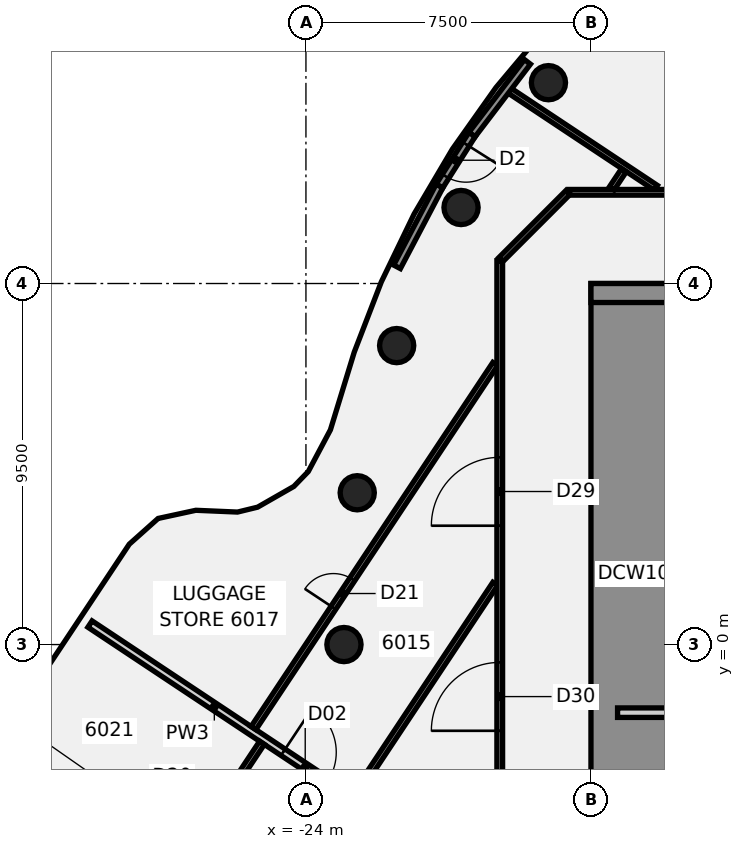
"""IFC4 building model, lengths in metres.
Left out: names, types, materials, properties, quantities, classifications, styles, units other than length and angle.
Written with IfcOpenShell. Run it as: python <this file> out.ifc"""

import sys

from ifc_helpers import new_model, si_unit, direction, frame, frame_2d, origin, origin_2d, place, context, subcontext, project, spatial, polyline, rectangle, circle, outline, extrude, element, fill, save


model = new_model("IFC4")
c1 = context("Model", 3, precision=1e-05, world=origin(), true_north=direction((0.0, 1.0)))
c2 = subcontext(c1, "Body", "Model", "MODEL_VIEW")
j1 = project(units=[si_unit("LENGTHUNIT", "METRE"), si_unit("PLANEANGLEUNIT", "RADIAN")], contexts=[c1])
p1 = place(None, origin())
s1 = spatial("IfcSite", under=j1, at=p1, CompositionType="ELEMENT")
p2 = place(p1, origin())
s2 = spatial("IfcBuilding", under=s1, at=p2, CompositionType="ELEMENT")
p3 = place(p2, frame((0.0, 0.0, 237.9)))
s3 = spatial("IfcBuildingStorey", under=s2, at=p3, CompositionType="ELEMENT", Elevation=237.9)
for number, where, z_axis, x_axis in (
    (1, (-17.619, 14.784, -0.14), (0.0, 0.0, 1.0), (1.0, 0.0, 0.0)),
    (2, (-19.919, 11.5, -0.14), (0.0, 0.0, 1.0), (1.0, 0.0, 0.0)),
    (3, (-21.613, 7.866, -0.14), (0.0, 0.0, 1.0), (1.0, 0.0, 0.0)),
    (4, (-22.651, 3.994, -0.14), (0.0, 0.0, 1.0), (1.0, 0.0, 0.0)),
    (5, (-23.0, 0.0, -0.14), (0.0, 0.0, 1.0), (1.0, 0.0, 0.0)),
):
    element("IfcColumn", number, at=place(p3, frame(where, z_axis=z_axis, x_axis=x_axis)), inside=s3, PredefinedType="COLUMN", context=c2, shape_type="SweptSolid", body=[
        extrude(circle(Radius=0.45, at=origin_2d()), origin(), (0.0, 0.0, 1.0), 3.6),
    ])
p4 = place(p3, frame((-29.683, 0.539, 0.0), z_axis=(0.0, 0.0, 1.0), x_axis=(0.8331102862, -0.553106907413, 0.0)))
e6 = element("IfcWall", 6, at=p4, inside=s3, PredefinedType="PARTITIONING", context=c2, shape_type="SweptSolid", body=[
    extrude(rectangle(XDim=7.855, YDim=0.2, at=frame_2d((3.928, 0.0))), origin(), (0.0, 0.0, 1.0), 2.864),
])
p5 = place(p4, frame((6.099, 0.0, 0.0)))
e7 = element("IfcOpeningElement", 7, at=p5, cuts=e6, PredefinedType="OPENING", context=c2, shape_type="SweptSolid", body=[
    extrude(rectangle(XDim=1.4, YDim=2.1, at=frame_2d((0.7, 1.05))), frame((0.0, 0.11, 0.0), z_axis=(0.0, -1.0, 0.0), x_axis=(1.0, 0.0, 0.0)), (0.0, 0.0, 1.0), 0.22),
])
p6 = place(p3, frame((-18.663, 14.589, 0.0), z_axis=(0.0, 0.0, 1.0), x_axis=(0.833043201899, -0.553207938997, 0.0)))
e8 = element("IfcWall", 8, at=p6, inside=s3, PredefinedType="PARTITIONING", context=c2, shape_type="SweptSolid", body=[
    extrude(rectangle(XDim=4.647, YDim=0.15, at=frame_2d((2.323, 0.0))), origin(), (0.0, 0.0, 1.0), 2.864),
])
p7 = place(p3, frame((-17.065, 11.9, 0.0), z_axis=(0.0, 0.0, 1.0), x_axis=(1.0, 0.0, 0.0)))
e9 = element("IfcWall", 9, at=p7, inside=s3, PredefinedType="PARTITIONING", context=c2, shape_type="SweptSolid", body=[
    extrude(rectangle(XDim=34.165, YDim=0.15, at=frame_2d((17.083, 0.0))), origin(), (0.0, 0.0, 1.0), 2.864),
])
p8 = place(p7, frame((24.711, 0.0, 0.0)))
e10 = element("IfcOpeningElement", 10, at=p8, cuts=e9, PredefinedType="OPENING", context=c2, shape_type="SweptSolid", body=[
    extrude(rectangle(XDim=1.8, YDim=2.1, at=frame_2d((0.9, 1.05))), frame((0.0, 0.085, 0.0), z_axis=(0.0, -1.0, 0.0), x_axis=(1.0, 0.0, 0.0)), (0.0, 0.0, 1.0), 0.17),
])
p9 = place(p7, frame((9.652, 0.0, 0.0)))
e11 = element("IfcOpeningElement", 11, at=p9, cuts=e9, PredefinedType="OPENING", context=c2, shape_type="SweptSolid", body=[
    extrude(rectangle(XDim=1.8, YDim=2.1, at=frame_2d((0.9, 1.05))), frame((0.0, 0.085, 0.0), z_axis=(0.0, -1.0, 0.0), x_axis=(1.0, 0.0, 0.0)), (0.0, 0.0, 1.0), 0.17),
])
p10 = place(p7, frame((2.602, 0.0, 0.0)))
e12 = element("IfcOpeningElement", 12, at=p10, cuts=e9, PredefinedType="OPENING", context=c2, shape_type="SweptSolid", body=[
    extrude(rectangle(XDim=1.8, YDim=2.1, at=frame_2d((0.9, 1.05))), frame((0.0, 0.085, 0.0), z_axis=(0.0, -1.0, 0.0), x_axis=(1.0, 0.0, 0.0)), (0.0, 0.0, 1.0), 0.17),
])
p11 = place(p3, frame((-18.872, 10.128, 0.0), z_axis=(0.0, 0.0, 1.0), x_axis=(0.707106781187, 0.707106781187, 0.0)))
e13 = element("IfcWall", 13, at=p11, inside=s3, PredefinedType="PARTITIONING", context=c2, shape_type="SweptSolid", body=[
    extrude(rectangle(XDim=2.505, YDim=0.15, at=frame_2d((1.253, 0.0))), origin(), (0.0, 0.0, 1.0), 2.864),
])
p12 = place(p3, frame((-27.292, -5.8, 0.0), z_axis=(0.0, 0.0, 1.0), x_axis=(0.553107875526, 0.833109643463, 0.0)))
e14 = element("IfcWall", 14, at=p12, inside=s3, PredefinedType="PARTITIONING", context=c2, shape_type="SweptSolid", body=[
    extrude(rectangle(XDim=3.859, YDim=0.15, at=frame_2d((1.93, 0.0))), origin(), (0.0, 0.0, 1.0), 2.864),
])
p13 = place(p12, frame((1.05, 0.0, 0.0)))
e15 = element("IfcOpeningElement", 15, at=p13, cuts=e14, PredefinedType="OPENING", context=c2, shape_type="SweptSolid", body=[
    extrude(rectangle(XDim=0.9, YDim=2.1, at=frame_2d((0.45, 1.05))), frame((0.0, 0.085, 0.0), z_axis=(0.0, -1.0, 0.0), x_axis=(1.0, 0.0, 0.0)), (0.0, 0.0, 1.0), 0.17),
])
p14 = place(p3, frame((-25.38, -2.198, 0.0), z_axis=(0.0, 0.0, 1.0), x_axis=(0.553121660505, 0.833100491346, 0.0)))
e16 = element("IfcWall", 16, at=p14, inside=s3, PredefinedType="PARTITIONING", context=c2, shape_type="SweptSolid", body=[
    extrude(rectangle(XDim=11.5, YDim=0.15, at=frame_2d((5.75, 0.0))), origin(), (0.0, 0.0, 1.0), 2.864),
])
p15 = place(p14, frame((3.8, 0.0, 0.0)))
e17 = element("IfcOpeningElement", 17, at=p15, cuts=e16, PredefinedType="OPENING", context=c2, shape_type="SweptSolid", body=[
    extrude(rectangle(XDim=0.9, YDim=2.1, at=frame_2d((0.45, 1.05))), frame((0.0, 0.085, 0.0), z_axis=(0.0, -1.0, 0.0), x_axis=(1.0, 0.0, 0.0)), (0.0, 0.0, 1.0), 0.17),
])
p16 = place(p3, frame((-15.954, 12.0, 0.0), z_axis=(0.0, 0.0, 1.0), x_axis=(0.55314016621, 0.833088204529, 0.0)))
e18 = element("IfcWall", 18, at=p16, inside=s3, PredefinedType="PARTITIONING", context=c2, shape_type="SweptSolid", body=[
    extrude(rectangle(XDim=0.578, YDim=0.15, at=frame_2d((0.289, 0.0))), origin(), (0.0, 0.0, 1.0), 2.864),
])
p17 = place(p3, frame((-22.46, -3.585, 0.0), z_axis=(0.0, 0.0, 1.0), x_axis=(0.55308718421, 0.833123380216, 0.0)))
e19 = element("IfcWall", 19, at=p17, inside=s3, PredefinedType="PARTITIONING", context=c2, shape_type="SweptSolid", body=[
    extrude(rectangle(XDim=6.221, YDim=0.15, at=frame_2d((3.111, 0.0))), origin(), (0.0, 0.0, 1.0), 2.864),
])
p18 = place(p3, frame((-18.9, -10.1, 0.0), z_axis=(0.0, 0.0, 1.0), x_axis=(0.0, 1.0, 0.0)))
e20 = element("IfcWall", 20, at=p18, inside=s3, PredefinedType="PARTITIONING", context=c2, shape_type="SweptSolid", body=[
    extrude(rectangle(XDim=20.2, YDim=0.15, at=frame_2d((10.1, 0.0))), origin(), (0.0, 0.0, 1.0), 2.864),
])
p19 = place(p18, frame((13.227, 0.0, 0.0)))
e21 = element("IfcOpeningElement", 21, at=p19, cuts=e20, PredefinedType="OPENING", context=c2, shape_type="SweptSolid", body=[
    extrude(rectangle(XDim=1.8, YDim=2.1, at=frame_2d((0.9, 1.05))), frame((0.0, 0.085, 0.0), z_axis=(0.0, -1.0, 0.0), x_axis=(1.0, 0.0, 0.0)), (0.0, 0.0, 1.0), 0.17),
])
p20 = place(p18, frame((7.831, 0.0, 0.0)))
e22 = element("IfcOpeningElement", 22, at=p20, cuts=e20, PredefinedType="OPENING", context=c2, shape_type="SweptSolid", body=[
    extrude(rectangle(XDim=1.8, YDim=2.1, at=frame_2d((0.9, 1.05))), frame((0.0, 0.085, 0.0), z_axis=(0.0, -1.0, 0.0), x_axis=(1.0, 0.0, 0.0)), (0.0, 0.0, 1.0), 0.17),
])
p21 = place(p18, frame((1.629, 0.0, 0.0)))
e23 = element("IfcOpeningElement", 23, at=p21, cuts=e20, PredefinedType="OPENING", context=c2, shape_type="SweptSolid", body=[
    extrude(rectangle(XDim=0.9, YDim=2.1, at=frame_2d((0.45, 1.05))), frame((0.0, 0.085, 0.0), z_axis=(0.0, -1.0, 0.0), x_axis=(1.0, 0.0, 0.0)), (0.0, 0.0, 1.0), 0.17),
])
p22 = place(p3, frame((-18.171, 15.332, 0.0), z_axis=(0.0, 0.0, 1.0), x_axis=(-0.606394798993, -0.795163723867, 0.0)))
e24 = element("IfcWall", 24, at=p22, inside=s3, PredefinedType="SOLIDWALL", context=c2, shape_type="SweptSolid", body=[
    extrude(rectangle(XDim=2.406, YDim=0.2, at=frame_2d((1.203, 0.0))), origin(), (0.0, 0.0, 1.0), 3.46),
])
p23 = place(p3, frame((-20.485, 12.068, 0.0), z_axis=(0.0, 0.0, 1.0), x_axis=(-0.464985044418, -0.88531853503, 0.0)))
e25 = element("IfcWall", 25, at=p23, inside=s3, PredefinedType="SOLIDWALL", context=c2, shape_type="SweptSolid", body=[
    extrude(rectangle(XDim=2.406, YDim=0.2, at=frame_2d((1.203, 0.0))), origin(), (0.0, 0.0, 1.0), 3.46),
])
p24 = place(p3, frame((-19.63, 13.419, 0.0), z_axis=(0.0, 0.0, 1.0), x_axis=(-0.534630584226, -0.845085876352, 0.0)))
e26 = element("IfcWall", 26, at=p24, inside=s3, PredefinedType="SOLIDWALL", context=c2, shape_type="SweptSolid", body=[
    extrude(rectangle(XDim=1.599, YDim=0.2, at=frame_2d((0.799, 0.0))), origin(), (0.0, 0.0, 1.0), 3.46),
])
p25 = place(p24, frame((0.299, 0.0, 0.0)))
e27 = element("IfcOpeningElement", 27, at=p25, cuts=e26, PredefinedType="OPENING", context=c2, shape_type="SweptSolid", body=[
    extrude(rectangle(XDim=1.0, YDim=2.4, at=frame_2d((0.5, 1.2))), frame((0.0, 0.11, 0.0), z_axis=(0.0, -1.0, 0.0), x_axis=(1.0, 0.0, 0.0)), (0.0, 0.0, 1.0), 0.22),
])
p26 = place(p3, origin())
e28 = element("IfcWall", 28, at=p26, inside=s3, PredefinedType="SHEAR", context=c2, shape_type="SweptSolid", body=[
    extrude(outline(polyline([(-13.5, -8.125), (-16.0, -8.125), (-16.0, -5.625), (-13.5, -5.625), (-13.5, -5.375), (-16.0, -5.375), (-16.0, 5.375), (-13.5, 5.375), (-13.5, 5.625), (-16.0, 5.625), (-16.0, 8.125), (-13.5, 8.125), (-13.5, 9.0), (-16.0, 9.0), (-16.5, 9.0), (-16.5, -9.0), (-16.0, -9.0), (-13.5, -9.0), (-13.5, -8.125)])), origin(), (0.0, 0.0, 1.0), 3.46),
])
p27 = place(p3, frame((-16.5, 9.25, 0.0), z_axis=(0.0, 0.0, 1.0), x_axis=(1.0, 0.0, 0.0)))
e29 = element("IfcWall", 29, at=p27, inside=s3, PredefinedType="SHEAR", context=c2, shape_type="SweptSolid", body=[
    extrude(rectangle(XDim=13.0, YDim=0.5, at=frame_2d((6.5, 0.0))), origin(), (0.0, 0.0, 1.0), 3.46),
])
p28 = place(p3, frame((-15.8, -1.792, 0.0), z_axis=(0.0, 0.0, 1.0), x_axis=(1.0, 0.0, 0.0)))
e30 = element("IfcWall", 30, at=p28, inside=s3, PredefinedType="PARTITIONING", context=c2, shape_type="SweptSolid", body=[
    extrude(rectangle(XDim=2.3, YDim=0.25, at=frame_2d((1.15, 0.0))), origin(), (0.0, 0.0, 1.0), 3.46),
])
p29 = place(p5, origin())
e31 = element("IfcDoor", 31, at=p29, inside=s3, OperationType="DOUBLE_DOOR_SINGLE_SWING", PredefinedType="DOOR", context=c2, shape_type="SweptSolid", body=[
    extrude(rectangle(XDim=1.4, YDim=2.1, at=frame_2d((0.7, 1.05))), frame((0.0, 0.025, 0.0), z_axis=(0.0, -1.0, 0.0), x_axis=(1.0, 0.0, 0.0)), (0.0, 0.0, 1.0), 0.05),
])
fill(e7, e31)
p30 = place(p15, origin())
e32 = element("IfcDoor", 32, at=p30, inside=s3, OperationType="SINGLE_SWING_RIGHT", PredefinedType="DOOR", context=c2, shape_type="SweptSolid", body=[
    extrude(rectangle(XDim=0.9, YDim=2.1, at=frame_2d((0.45, 1.05))), frame((0.0, 0.025, 0.0), z_axis=(0.0, -1.0, 0.0), x_axis=(1.0, 0.0, 0.0)), (0.0, 0.0, 1.0), 0.05),
])
fill(e17, e32)
p31 = place(p19, frame((1.8, 0.0, 0.0), z_axis=(0.0, 0.0, 1.0), x_axis=(-1.0, 0.0, 0.0)))
e33 = element("IfcDoor", 33, at=p31, inside=s3, OperationType="DOUBLE_DOOR_SINGLE_SWING", PredefinedType="DOOR", context=c2, shape_type="SweptSolid", body=[
    extrude(rectangle(XDim=1.8, YDim=2.1, at=frame_2d((0.9, 1.05))), frame((0.0, 0.025, 0.0), z_axis=(0.0, -1.0, 0.0), x_axis=(1.0, 0.0, 0.0)), (0.0, 0.0, 1.0), 0.05),
])
fill(e21, e33)
p32 = place(p20, origin())
e34 = element("IfcDoor", 34, at=p32, inside=s3, OperationType="DOUBLE_DOOR_SINGLE_SWING", PredefinedType="DOOR", context=c2, shape_type="SweptSolid", body=[
    extrude(rectangle(XDim=1.8, YDim=2.1, at=frame_2d((0.9, 1.05))), frame((0.0, 0.025, 0.0), z_axis=(0.0, -1.0, 0.0), x_axis=(1.0, 0.0, 0.0)), (0.0, 0.0, 1.0), 0.05),
])
fill(e22, e34)
p33 = place(p25, origin())
e35 = element("IfcDoor", 35, at=p33, inside=s3, OperationType="SINGLE_SWING_LEFT", PredefinedType="DOOR", context=c2, shape_type="SweptSolid", body=[
    extrude(rectangle(XDim=1.0, YDim=2.4, at=frame_2d((0.5, 1.2))), frame((0.0, 0.025, 0.0), z_axis=(0.0, -1.0, 0.0), x_axis=(1.0, 0.0, 0.0)), (0.0, 0.0, 1.0), 0.05),
])
fill(e27, e35)
save(model, sys.argv[1])
